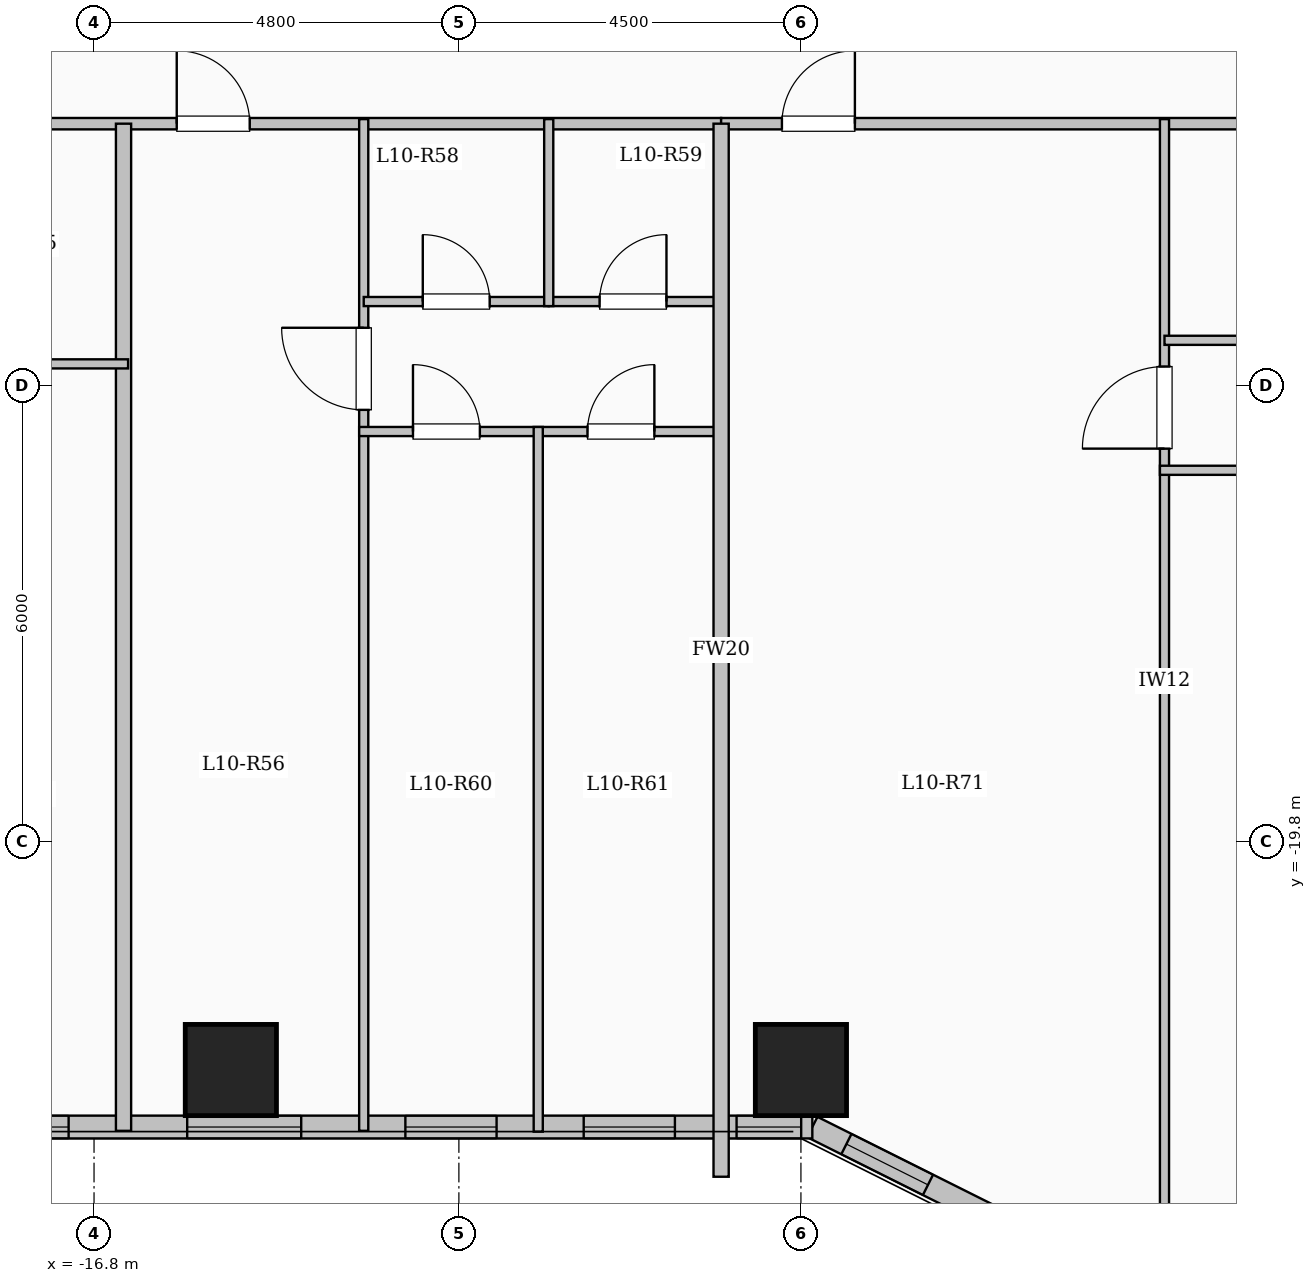
"""IFC4 building model, lengths in metres.
Left out: names, types, materials, properties, quantities, classifications, styles, units other than length and angle.
Written with IfcOpenShell. Run it as: python <this file> out.ifc"""

import sys

from ifc_helpers import new_model, si_unit, direction, frame, frame_2d, origin, origin_2d, place, context, subcontext, project, spatial, rectangle, extrude, element, fill, save


model = new_model("IFC4")
c1 = context("Model", 3, precision=1e-05, world=origin(), true_north=direction((0.0, 1.0)))
c2 = subcontext(c1, "Body", "Model", "MODEL_VIEW")
j1 = project(units=[si_unit("LENGTHUNIT", "METRE"), si_unit("PLANEANGLEUNIT", "RADIAN")], contexts=[c1])
p1 = place(None, origin())
s1 = spatial("IfcSite", under=j1, at=p1, CompositionType="ELEMENT")
p2 = place(p1, origin())
s2 = spatial("IfcBuilding", under=s1, at=p2, CompositionType="ELEMENT")
p3 = place(p2, frame((0.0, 0.0, 40.75)))
s3 = spatial("IfcBuildingStorey", under=s2, at=p3, CompositionType="ELEMENT", Elevation=40.75)
for number, where, z_axis, x_axis in (
    (1, (-15.0, -22.8, 0.0), (0.0, 0.0, 1.0), (1.0, 0.0, 0.0)),
    (2, (-7.5, -22.8, 0.0), (0.0, 0.0, 1.0), (1.0, 0.0, 0.0)),
):
    element("IfcColumn", number, at=place(p3, frame(where, z_axis=z_axis, x_axis=x_axis)), inside=s3, PredefinedType="COLUMN", context=c2, shape_type="SweptSolid", body=[
        extrude(rectangle(XDim=1.2, YDim=1.2, at=origin_2d()), origin(), (0.0, 0.0, 1.0), 3.35),
    ])
p4 = place(p3, frame((-4.35, -25.05, 0.0), z_axis=(0.0, 0.0, 1.0), x_axis=(-0.894427191, 0.4472135955, 0.0)))
e3 = element("IfcWall", 3, at=p4, inside=s3, PredefinedType="SOLIDWALL", context=c2, shape_type="SweptSolid", body=[
    extrude(rectangle(XDim=3.354, YDim=0.3, at=frame_2d((1.677, 0.0))), origin(), (0.0, 0.0, 1.0), 3.1),
])
p5 = place(p4, frame((1.653, 0.0, 0.95)))
e4 = element("IfcOpeningElement", 4, at=p5, cuts=e3, PredefinedType="OPENING", context=c2, shape_type="SweptSolid", body=[
    extrude(rectangle(XDim=1.2, YDim=1.5, at=frame_2d((0.6, 0.75))), frame((0.0, 0.16, 0.0), z_axis=(0.0, -1.0, 0.0), x_axis=(1.0, 0.0, 0.0)), (0.0, 0.0, 1.0), 0.32),
])
p6 = place(p3, frame((-7.35, -23.55, 0.0), z_axis=(0.0, 0.0, 1.0), x_axis=(-1.0, 0.0, 0.0)))
e5 = element("IfcWall", 5, at=p6, inside=s3, PredefinedType="SOLIDWALL", context=c2, shape_type="SweptSolid", body=[
    extrude(rectangle(XDim=15.3, YDim=0.3, at=frame_2d((7.65, 0.0))), origin(), (0.0, 0.0, 1.0), 3.1),
])
p7 = place(p6, frame((0.147, 0.0, 0.95)))
e6 = element("IfcOpeningElement", 6, at=p7, cuts=e5, PredefinedType="OPENING", context=c2, shape_type="SweptSolid", body=[
    extrude(rectangle(XDim=0.85, YDim=1.5, at=frame_2d((0.425, 0.75))), frame((0.0, 0.16, 0.0), z_axis=(0.0, -1.0, 0.0), x_axis=(1.0, 0.0, 0.0)), (0.0, 0.0, 1.0), 0.32),
])
p8 = place(p6, frame((1.808, 0.0, 0.95)))
e7 = element("IfcOpeningElement", 7, at=p8, cuts=e5, PredefinedType="OPENING", context=c2, shape_type="SweptSolid", body=[
    extrude(rectangle(XDim=1.2, YDim=1.5, at=frame_2d((0.6, 0.75))), frame((0.0, 0.16, 0.0), z_axis=(0.0, -1.0, 0.0), x_axis=(1.0, 0.0, 0.0)), (0.0, 0.0, 1.0), 0.32),
])
p9 = place(p6, frame((4.154, 0.0, 0.95)))
e8 = element("IfcOpeningElement", 8, at=p9, cuts=e5, PredefinedType="OPENING", context=c2, shape_type="SweptSolid", body=[
    extrude(rectangle(XDim=1.2, YDim=1.5, at=frame_2d((0.6, 0.75))), frame((0.0, 0.16, 0.0), z_axis=(0.0, -1.0, 0.0), x_axis=(1.0, 0.0, 0.0)), (0.0, 0.0, 1.0), 0.32),
])
p10 = place(p6, frame((6.724, 0.0, 0.9)))
e9 = element("IfcOpeningElement", 9, at=p10, cuts=e5, PredefinedType="OPENING", context=c2, shape_type="SweptSolid", body=[
    extrude(rectangle(XDim=1.5, YDim=1.65, at=frame_2d((0.75, 0.825))), frame((0.0, 0.16, 0.0), z_axis=(0.0, -1.0, 0.0), x_axis=(1.0, 0.0, 0.0)), (0.0, 0.0, 1.0), 0.32),
])
p11 = place(p6, frame((9.784, 0.0, 0.9)))
e10 = element("IfcOpeningElement", 10, at=p11, cuts=e5, PredefinedType="OPENING", context=c2, shape_type="SweptSolid", body=[
    extrude(rectangle(XDim=1.5, YDim=1.65, at=frame_2d((0.75, 0.825))), frame((0.0, 0.16, 0.0), z_axis=(0.0, -1.0, 0.0), x_axis=(1.0, 0.0, 0.0)), (0.0, 0.0, 1.0), 0.32),
])
p12 = place(p6, frame((12.869, 0.0, 0.9)))
e11 = element("IfcOpeningElement", 11, at=p12, cuts=e5, PredefinedType="OPENING", context=c2, shape_type="SweptSolid", body=[
    extrude(rectangle(XDim=1.5, YDim=1.65, at=frame_2d((0.75, 0.825))), frame((0.0, 0.16, 0.0), z_axis=(0.0, -1.0, 0.0), x_axis=(1.0, 0.0, 0.0)), (0.0, 0.0, 1.0), 0.32),
])
p13 = place(p3, frame((-22.55, -10.35, 0.0), z_axis=(0.0, 0.0, 1.0), x_axis=(1.0, 0.0, 0.0)))
e12 = element("IfcWall", 12, at=p13, inside=s3, PredefinedType="PARTITIONING", context=c2, shape_type="SweptSolid", body=[
    extrude(rectangle(XDim=14.0, YDim=0.15, at=frame_2d((7.0, 0.0))), origin(), (0.0, 0.0, 1.0), 3.1),
])
p14 = place(p13, frame((0.7, 0.0, 0.0)))
e13 = element("IfcOpeningElement", 13, at=p14, cuts=e12, PredefinedType="OPENING", context=c2, shape_type="SweptSolid", body=[
    extrude(rectangle(XDim=0.96, YDim=2.15, at=frame_2d((0.48, 1.075))), frame((0.0, 0.085, 0.0), z_axis=(0.0, -1.0, 0.0), x_axis=(1.0, 0.0, 0.0)), (0.0, 0.0, 1.0), 0.17),
])
p15 = place(p13, frame((6.838, 0.0, 0.0)))
e14 = element("IfcOpeningElement", 14, at=p15, cuts=e12, PredefinedType="OPENING", context=c2, shape_type="SweptSolid", body=[
    extrude(rectangle(XDim=0.96, YDim=2.15, at=frame_2d((0.48, 1.075))), frame((0.0, 0.085, 0.0), z_axis=(0.0, -1.0, 0.0), x_axis=(1.0, 0.0, 0.0)), (0.0, 0.0, 1.0), 0.17),
])
p16 = place(p3, frame((-8.55, -10.35, 0.0), z_axis=(0.0, 0.0, 1.0), x_axis=(1.0, 0.0, 0.0)))
e15 = element("IfcWall", 15, at=p16, inside=s3, PredefinedType="PARTITIONING", context=c2, shape_type="SweptSolid", body=[
    extrude(rectangle(XDim=17.1, YDim=0.15, at=frame_2d((8.55, 0.0))), origin(), (0.0, 0.0, 1.0), 3.1),
])
p17 = place(p16, frame((0.8, 0.0, 0.0)))
e16 = element("IfcOpeningElement", 16, at=p17, cuts=e15, PredefinedType="OPENING", context=c2, shape_type="SweptSolid", body=[
    extrude(rectangle(XDim=0.96, YDim=2.15, at=frame_2d((0.48, 1.075))), frame((0.0, 0.085, 0.0), z_axis=(0.0, -1.0, 0.0), x_axis=(1.0, 0.0, 0.0)), (0.0, 0.0, 1.0), 0.17),
])
p18 = place(p3, frame((-16.412, -23.6, 0.0), z_axis=(0.0, 0.0, 1.0), x_axis=(0.0, 1.0, 0.0)))
e17 = element("IfcWall", 17, at=p18, inside=s3, PredefinedType="SOLIDWALL", context=c2, shape_type="SweptSolid", body=[
    extrude(rectangle(XDim=13.25, YDim=0.2, at=frame_2d((6.625, 0.0))), origin(), (0.0, 0.0, 1.0), 3.1),
])
p19 = place(p3, frame((-19.421, -13.51, 0.0), z_axis=(0.0, 0.0, 1.0), x_axis=(1.0, 0.0, 0.0)))
e18 = element("IfcWall", 18, at=p19, inside=s3, PredefinedType="PARTITIONING", context=c2, shape_type="SweptSolid", body=[
    extrude(rectangle(XDim=3.069, YDim=0.12, at=frame_2d((1.534, 0.0))), origin(), (0.0, 0.0, 1.0), 3.1),
])
p20 = place(p3, frame((-13.252, -23.6, 0.0), z_axis=(0.0, 0.0, 1.0), x_axis=(0.0, 1.0, 0.0)))
e19 = element("IfcWall", 19, at=p20, inside=s3, PredefinedType="PARTITIONING", context=c2, shape_type="SweptSolid", body=[
    extrude(rectangle(XDim=13.31, YDim=0.12, at=frame_2d((6.655, 0.0))), origin(), (0.0, 0.0, 1.0), 3.1),
])
p21 = place(p20, frame((9.485, 0.0, 0.0)))
e20 = element("IfcOpeningElement", 20, at=p21, cuts=e19, PredefinedType="OPENING", context=c2, shape_type="SweptSolid", body=[
    extrude(rectangle(XDim=1.08, YDim=2.15, at=frame_2d((0.54, 1.075))), frame((0.0, 0.07, 0.0), z_axis=(0.0, -1.0, 0.0), x_axis=(1.0, 0.0, 0.0)), (0.0, 0.0, 1.0), 0.14),
])
p22 = place(p3, frame((-13.252, -12.69, 0.0), z_axis=(0.0, 0.0, 1.0), x_axis=(1.0, 0.0, 0.0)))
e21 = element("IfcWall", 21, at=p22, inside=s3, PredefinedType="PARTITIONING", context=c2, shape_type="SweptSolid", body=[
    extrude(rectangle(XDim=2.434, YDim=0.12, at=frame_2d((1.217, 0.0))), origin(), (0.0, 0.0, 1.0), 2.585),
])
p23 = place(p22, frame((0.777, 0.0, 0.0)))
e22 = element("IfcOpeningElement", 22, at=p23, cuts=e21, PredefinedType="OPENING", context=c2, shape_type="SweptSolid", body=[
    extrude(rectangle(XDim=0.88, YDim=2.1, at=frame_2d((0.44, 1.05))), frame((0.0, 0.07, 0.0), z_axis=(0.0, -1.0, 0.0), x_axis=(1.0, 0.0, 0.0)), (0.0, 0.0, 1.0), 0.14),
])
p24 = place(p3, frame((-10.818, -12.69, 0.0), z_axis=(0.0, 0.0, 1.0), x_axis=(1.0, 0.0, 0.0)))
e23 = element("IfcWall", 23, at=p24, inside=s3, PredefinedType="PARTITIONING", context=c2, shape_type="SweptSolid", body=[
    extrude(rectangle(XDim=2.218, YDim=0.12, at=frame_2d((1.109, 0.0))), origin(), (0.0, 0.0, 1.0), 2.585),
])
p25 = place(p24, frame((0.669, 0.0, 0.0)))
e24 = element("IfcOpeningElement", 24, at=p25, cuts=e23, PredefinedType="OPENING", context=c2, shape_type="SweptSolid", body=[
    extrude(rectangle(XDim=0.88, YDim=2.1, at=frame_2d((0.44, 1.05))), frame((0.0, 0.07, 0.0), z_axis=(0.0, -1.0, 0.0), x_axis=(1.0, 0.0, 0.0)), (0.0, 0.0, 1.0), 0.14),
])
p26 = place(p3, frame((-13.312, -14.4, 0.0), z_axis=(0.0, 0.0, 1.0), x_axis=(1.0, 0.0, 0.0)))
e25 = element("IfcWall", 25, at=p26, inside=s3, PredefinedType="PARTITIONING", context=c2, shape_type="SweptSolid", body=[
    extrude(rectangle(XDim=4.772, YDim=0.12, at=frame_2d((2.386, 0.0))), origin(), (0.0, 0.0, 1.0), 3.1),
])
p27 = place(p26, frame((0.708, 0.0, 0.0)))
e26 = element("IfcOpeningElement", 26, at=p27, cuts=e25, PredefinedType="OPENING", context=c2, shape_type="SweptSolid", body=[
    extrude(rectangle(XDim=0.88, YDim=2.1, at=frame_2d((0.44, 1.05))), frame((0.0, 0.07, 0.0), z_axis=(0.0, -1.0, 0.0), x_axis=(1.0, 0.0, 0.0)), (0.0, 0.0, 1.0), 0.14),
])
p28 = place(p26, frame((3.004, 0.0, 0.0)))
e27 = element("IfcOpeningElement", 27, at=p28, cuts=e25, PredefinedType="OPENING", context=c2, shape_type="SweptSolid", body=[
    extrude(rectangle(XDim=0.88, YDim=2.1, at=frame_2d((0.44, 1.05))), frame((0.0, 0.07, 0.0), z_axis=(0.0, -1.0, 0.0), x_axis=(1.0, 0.0, 0.0)), (0.0, 0.0, 1.0), 0.14),
])
p29 = place(p3, frame((-10.818, -12.75, 0.0), z_axis=(0.0, 0.0, 1.0), x_axis=(0.0, 1.0, 0.0)))
e28 = element("IfcWall", 28, at=p29, inside=s3, PredefinedType="PARTITIONING", context=c2, shape_type="SweptSolid", body=[
    extrude(rectangle(XDim=2.46, YDim=0.12, at=frame_2d((1.23, 0.0))), origin(), (0.0, 0.0, 1.0), 3.1),
])
p30 = place(p3, frame((-10.956, -23.611, 0.0), z_axis=(0.0, 0.0, 1.0), x_axis=(0.0, 1.0, 0.0)))
e29 = element("IfcWall", 29, at=p30, inside=s3, PredefinedType="PARTITIONING", context=c2, shape_type="SweptSolid", body=[
    extrude(rectangle(XDim=9.271, YDim=0.12, at=frame_2d((4.635, 0.0))), origin(), (0.0, 0.0, 1.0), 3.1),
])
p31 = place(p3, frame((-8.55, -24.204, 0.0), z_axis=(0.0, 0.0, 1.0), x_axis=(0.0, 1.0, 0.0)))
e30 = element("IfcWall", 30, at=p31, inside=s3, PredefinedType="SOLIDWALL", context=c2, shape_type="SweptSolid", body=[
    extrude(rectangle(XDim=13.854, YDim=0.2, at=frame_2d((6.927, 0.0))), origin(), (0.0, 0.0, 1.0), 3.1),
])
p32 = place(p3, frame((-2.717, -25.08, 0.0), z_axis=(0.0, 0.0, 1.0), x_axis=(0.0, 1.0, 0.0)))
e31 = element("IfcWall", 31, at=p32, inside=s3, PredefinedType="PARTITIONING", context=c2, shape_type="SweptSolid", body=[
    extrude(rectangle(XDim=14.79, YDim=0.12, at=frame_2d((7.395, 0.0))), origin(), (0.0, 0.0, 1.0), 3.1),
])
p33 = place(p32, frame((10.455, 0.0, 0.0)))
e32 = element("IfcOpeningElement", 32, at=p33, cuts=e31, PredefinedType="OPENING", context=c2, shape_type="SweptSolid", body=[
    extrude(rectangle(XDim=1.08, YDim=2.15, at=frame_2d((0.54, 1.075))), frame((0.0, 0.07, 0.0), z_axis=(0.0, -1.0, 0.0), x_axis=(1.0, 0.0, 0.0)), (0.0, 0.0, 1.0), 0.14),
])
p34 = place(p3, frame((-2.717, -13.2, 0.0), z_axis=(0.0, 0.0, 1.0), x_axis=(1.0, 0.0, 0.0)))
e33 = element("IfcWall", 33, at=p34, inside=s3, PredefinedType="PARTITIONING", context=c2, shape_type="SweptSolid", body=[
    extrude(rectangle(XDim=5.94, YDim=0.12, at=frame_2d((2.97, 0.0))), origin(), (0.0, 0.0, 1.0), 3.1),
])
p35 = place(p34, frame((2.53, 0.0, 0.0)))
e34 = element("IfcOpeningElement", 34, at=p35, cuts=e33, PredefinedType="OPENING", context=c2, shape_type="SweptSolid", body=[
    extrude(rectangle(XDim=0.88, YDim=2.1, at=frame_2d((0.44, 1.05))), frame((0.0, 0.07, 0.0), z_axis=(0.0, -1.0, 0.0), x_axis=(1.0, 0.0, 0.0)), (0.0, 0.0, 1.0), 0.14),
])
p36 = place(p3, frame((-2.777, -14.91, 0.0), z_axis=(0.0, 0.0, 1.0), x_axis=(1.0, 0.0, 0.0)))
e35 = element("IfcWall", 35, at=p36, inside=s3, PredefinedType="PARTITIONING", context=c2, shape_type="SweptSolid", body=[
    extrude(rectangle(XDim=11.387, YDim=0.12, at=frame_2d((5.694, 0.0))), origin(), (0.0, 0.0, 1.0), 2.585),
])
p37 = place(p36, frame((1.428, 0.0, 0.0)))
e36 = element("IfcOpeningElement", 36, at=p37, cuts=e35, PredefinedType="OPENING", context=c2, shape_type="SweptSolid", body=[
    extrude(rectangle(XDim=0.88, YDim=2.1, at=frame_2d((0.44, 1.05))), frame((0.0, 0.07, 0.0), z_axis=(0.0, -1.0, 0.0), x_axis=(1.0, 0.0, 0.0)), (0.0, 0.0, 1.0), 0.14),
])
p38 = place(p36, frame((5.164, 0.0, 0.0)))
e37 = element("IfcOpeningElement", 37, at=p38, cuts=e35, PredefinedType="OPENING", context=c2, shape_type="SweptSolid", body=[
    extrude(rectangle(XDim=0.88, YDim=2.1, at=frame_2d((0.44, 1.05))), frame((0.0, 0.07, 0.0), z_axis=(0.0, -1.0, 0.0), x_axis=(1.0, 0.0, 0.0)), (0.0, 0.0, 1.0), 0.14),
])
p39 = place(p36, frame((8.899, 0.0, 0.0)))
e38 = element("IfcOpeningElement", 38, at=p39, cuts=e35, PredefinedType="OPENING", context=c2, shape_type="SweptSolid", body=[
    extrude(rectangle(XDim=0.88, YDim=2.1, at=frame_2d((0.44, 1.05))), frame((0.0, 0.07, 0.0), z_axis=(0.0, -1.0, 0.0), x_axis=(1.0, 0.0, 0.0)), (0.0, 0.0, 1.0), 0.14),
])
p40 = place(p5, origin())
e39 = element("IfcWindow", 39, at=p40, inside=s3, PartitioningType="SINGLE_PANEL", PredefinedType="WINDOW", context=c2, shape_type="SweptSolid", body=[
    extrude(rectangle(XDim=1.2, YDim=1.5, at=frame_2d((0.6, 0.75))), frame((0.0, 0.03, 0.0), z_axis=(0.0, -1.0, 0.0), x_axis=(1.0, 0.0, 0.0)), (0.0, 0.0, 1.0), 0.06),
])
fill(e4, e39)
p41 = place(p7, origin())
e40 = element("IfcWindow", 40, at=p41, inside=s3, PartitioningType="SINGLE_PANEL", PredefinedType="WINDOW", context=c2, shape_type="SweptSolid", body=[
    extrude(rectangle(XDim=0.85, YDim=1.5, at=frame_2d((0.425, 0.75))), frame((0.0, 0.03, 0.0), z_axis=(0.0, -1.0, 0.0), x_axis=(1.0, 0.0, 0.0)), (0.0, 0.0, 1.0), 0.06),
])
fill(e6, e40)
p42 = place(p8, origin())
e41 = element("IfcWindow", 41, at=p42, inside=s3, PartitioningType="SINGLE_PANEL", PredefinedType="WINDOW", context=c2, shape_type="SweptSolid", body=[
    extrude(rectangle(XDim=1.2, YDim=1.5, at=frame_2d((0.6, 0.75))), frame((0.0, 0.03, 0.0), z_axis=(0.0, -1.0, 0.0), x_axis=(1.0, 0.0, 0.0)), (0.0, 0.0, 1.0), 0.06),
])
fill(e7, e41)
p43 = place(p9, origin())
e42 = element("IfcWindow", 42, at=p43, inside=s3, PartitioningType="SINGLE_PANEL", PredefinedType="WINDOW", context=c2, shape_type="SweptSolid", body=[
    extrude(rectangle(XDim=1.2, YDim=1.5, at=frame_2d((0.6, 0.75))), frame((0.0, 0.03, 0.0), z_axis=(0.0, -1.0, 0.0), x_axis=(1.0, 0.0, 0.0)), (0.0, 0.0, 1.0), 0.06),
])
fill(e8, e42)
p44 = place(p10, origin())
e43 = element("IfcWindow", 43, at=p44, inside=s3, PartitioningType="SINGLE_PANEL", PredefinedType="WINDOW", context=c2, shape_type="SweptSolid", body=[
    extrude(rectangle(XDim=1.5, YDim=1.65, at=frame_2d((0.75, 0.825))), frame((0.0, 0.03, 0.0), z_axis=(0.0, -1.0, 0.0), x_axis=(1.0, 0.0, 0.0)), (0.0, 0.0, 1.0), 0.06),
])
fill(e9, e43)
p45 = place(p11, origin())
e44 = element("IfcWindow", 44, at=p45, inside=s3, PartitioningType="SINGLE_PANEL", PredefinedType="WINDOW", context=c2, shape_type="SweptSolid", body=[
    extrude(rectangle(XDim=1.5, YDim=1.65, at=frame_2d((0.75, 0.825))), frame((0.0, 0.03, 0.0), z_axis=(0.0, -1.0, 0.0), x_axis=(1.0, 0.0, 0.0)), (0.0, 0.0, 1.0), 0.06),
])
fill(e10, e44)
p46 = place(p15, origin())
e45 = element("IfcDoor", 45, at=p46, inside=s3, OperationType="SINGLE_SWING_LEFT", PredefinedType="DOOR", context=c2, shape_type="SweptSolid", body=[
    extrude(rectangle(XDim=0.96, YDim=2.15, at=frame_2d((0.48, 1.075))), frame((0.0, 0.025, 0.0), z_axis=(0.0, -1.0, 0.0), x_axis=(1.0, 0.0, 0.0)), (0.0, 0.0, 1.0), 0.05),
])
fill(e14, e45)
p47 = place(p21, origin())
e46 = element("IfcDoor", 46, at=p47, inside=s3, OperationType="SINGLE_SWING_RIGHT", PredefinedType="DOOR", context=c2, shape_type="SweptSolid", body=[
    extrude(rectangle(XDim=1.08, YDim=2.15, at=frame_2d((0.54, 1.075))), frame((0.0, 0.025, 0.0), z_axis=(0.0, -1.0, 0.0), x_axis=(1.0, 0.0, 0.0)), (0.0, 0.0, 1.0), 0.05),
])
fill(e20, e46)
p48 = place(p23, origin())
e47 = element("IfcDoor", 47, at=p48, inside=s3, OperationType="SINGLE_SWING_LEFT", PredefinedType="DOOR", context=c2, shape_type="SweptSolid", body=[
    extrude(rectangle(XDim=0.88, YDim=2.1, at=frame_2d((0.44, 1.05))), frame((0.0, 0.025, 0.0), z_axis=(0.0, -1.0, 0.0), x_axis=(1.0, 0.0, 0.0)), (0.0, 0.0, 1.0), 0.05),
])
fill(e22, e47)
p49 = place(p25, origin())
e48 = element("IfcDoor", 48, at=p49, inside=s3, OperationType="SINGLE_SWING_RIGHT", PredefinedType="DOOR", context=c2, shape_type="SweptSolid", body=[
    extrude(rectangle(XDim=0.88, YDim=2.1, at=frame_2d((0.44, 1.05))), frame((0.0, 0.025, 0.0), z_axis=(0.0, -1.0, 0.0), x_axis=(1.0, 0.0, 0.0)), (0.0, 0.0, 1.0), 0.05),
])
fill(e24, e48)
p50 = place(p27, origin())
e49 = element("IfcDoor", 49, at=p50, inside=s3, OperationType="SINGLE_SWING_LEFT", PredefinedType="DOOR", context=c2, shape_type="SweptSolid", body=[
    extrude(rectangle(XDim=0.88, YDim=2.1, at=frame_2d((0.44, 1.05))), frame((0.0, 0.025, 0.0), z_axis=(0.0, -1.0, 0.0), x_axis=(1.0, 0.0, 0.0)), (0.0, 0.0, 1.0), 0.05),
])
fill(e26, e49)
p51 = place(p28, origin())
e50 = element("IfcDoor", 50, at=p51, inside=s3, OperationType="SINGLE_SWING_RIGHT", PredefinedType="DOOR", context=c2, shape_type="SweptSolid", body=[
    extrude(rectangle(XDim=0.88, YDim=2.1, at=frame_2d((0.44, 1.05))), frame((0.0, 0.025, 0.0), z_axis=(0.0, -1.0, 0.0), x_axis=(1.0, 0.0, 0.0)), (0.0, 0.0, 1.0), 0.05),
])
fill(e27, e50)
p52 = place(p17, origin())
e51 = element("IfcDoor", 51, at=p52, inside=s3, OperationType="SINGLE_SWING_RIGHT", PredefinedType="DOOR", context=c2, shape_type="SweptSolid", body=[
    extrude(rectangle(XDim=0.96, YDim=2.15, at=frame_2d((0.48, 1.075))), frame((0.0, 0.025, 0.0), z_axis=(0.0, -1.0, 0.0), x_axis=(1.0, 0.0, 0.0)), (0.0, 0.0, 1.0), 0.05),
])
fill(e16, e51)
p53 = place(p33, origin())
e52 = element("IfcDoor", 52, at=p53, inside=s3, OperationType="SINGLE_SWING_LEFT", PredefinedType="DOOR", context=c2, shape_type="SweptSolid", body=[
    extrude(rectangle(XDim=1.08, YDim=2.15, at=frame_2d((0.54, 1.075))), frame((0.0, 0.025, 0.0), z_axis=(0.0, -1.0, 0.0), x_axis=(1.0, 0.0, 0.0)), (0.0, 0.0, 1.0), 0.05),
])
fill(e32, e52)
save(model, sys.argv[1])
